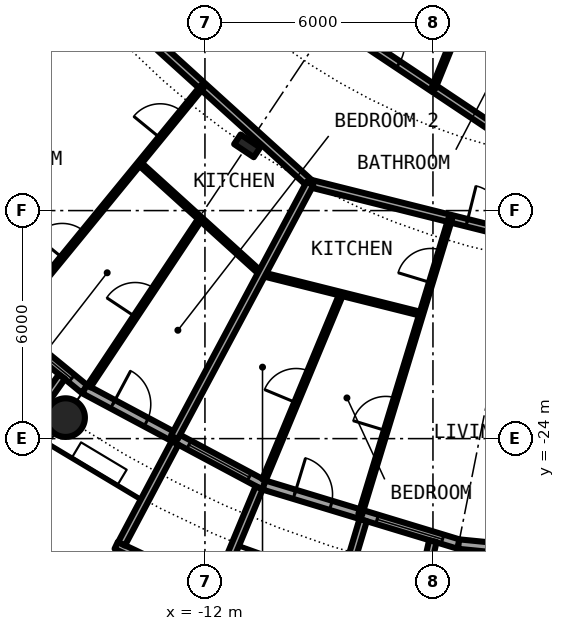
"""IFC4 building model, lengths in metres.
Left out: names, types, materials, properties, quantities, classifications, styles, units other than length and angle.
Written with IfcOpenShell. Run it as: python <this file> out.ifc"""

import sys

from ifc_helpers import new_model, si_unit, direction, frame, frame_2d, origin, origin_2d, place, context, subcontext, project, spatial, rectangle, circle, hollow_circle, i_section, extrude, element, fill, save


model = new_model("IFC4")
c1 = context("Model", 3, precision=1e-05, world=origin(), true_north=direction((0.0, 1.0)))
c2 = subcontext(c1, "Body", "Model", "MODEL_VIEW")
j1 = project(units=[si_unit("LENGTHUNIT", "METRE"), si_unit("PLANEANGLEUNIT", "RADIAN")], contexts=[c1])
p1 = place(None, origin())
s1 = spatial("IfcSite", under=j1, at=p1, CompositionType="ELEMENT")
p2 = place(p1, origin())
s2 = spatial("IfcBuilding", under=s1, at=p2, CompositionType="ELEMENT")
p3 = place(p2, frame((0.0, 0.0, 31.95)))
s3 = spatial("IfcBuildingStorey", under=s2, at=p3, CompositionType="ELEMENT", Elevation=31.95)
p4 = place(p3, frame((-15.667, -23.448, 0.0), z_axis=(0.0, 0.0, 1.0), x_axis=(1.0, 0.0, 0.0)))
e1 = element("IfcColumn", 1, at=p4, inside=s3, PredefinedType="COLUMN", context=c2, shape_type="SweptSolid", body=[
    extrude(hollow_circle(Radius=0.508, WallThickness=0.05, at=origin_2d()), origin(), (0.0, 0.0, 1.0), 3.05),
])
p5 = place(p3, frame((-10.889, -16.297, 0.0), z_axis=(0.0, 0.0, 1.0), x_axis=(-0.55557023302, -0.831469612303, 0.0)))
e2 = element("IfcColumn", 2, at=p5, inside=s3, PredefinedType="COLUMN", context=c2, shape_type="SweptSolid", body=[
    extrude(i_section(OverallWidth=0.305, OverallDepth=0.62, WebThickness=0.021, FlangeThickness=0.04, FilletRadius=0.027, at=origin_2d()), origin(), (0.0, 0.0, 1.0), 3.05),
])
p6 = place(p3, frame((-19.304, -19.304, 0.0), z_axis=(0.0, 0.0, 1.0), x_axis=(0.773019449054, -0.634382322723, 0.0)))
e3 = element("IfcWall", 3, at=p6, inside=s3, PredefinedType="SOLIDWALL", context=c2, shape_type="SweptSolid", body=[
    extrude(rectangle(XDim=5.352, YDim=0.25, at=frame_2d((2.676, 0.0))), origin(), (0.0, 0.0, 1.0), 2.7),
])
p7 = place(p6, frame((0.841, 0.0, 0.0)))
e4 = element("IfcOpeningElement", 4, at=p7, cuts=e3, PredefinedType="OPENING", context=c2, shape_type="SweptSolid", body=[
    extrude(rectangle(XDim=1.0, YDim=2.2, at=frame_2d((0.5, 1.1))), frame((0.0, 0.135, 0.0), z_axis=(0.0, -1.0, 0.0), x_axis=(1.0, 0.0, 0.0)), (0.0, 0.0, 1.0), 0.27),
])
p8 = place(p6, frame((3.111, 0.0, 0.3)))
e5 = element("IfcOpeningElement", 5, at=p8, cuts=e3, PredefinedType="OPENING", context=c2, shape_type="SweptSolid", body=[
    extrude(rectangle(XDim=1.8, YDim=2.1, at=frame_2d((0.9, 1.05))), frame((0.0, 0.135, 0.0), z_axis=(0.0, -1.0, 0.0), x_axis=(1.0, 0.0, 0.0)), (0.0, 0.0, 1.0), 0.27),
])
p9 = place(p3, frame((-15.765, -22.37, -0.03), z_axis=(0.0, 0.0, 1.0), x_axis=(-0.576274612209, -0.817256123454, 0.0)))
e6 = element("IfcWall", 6, at=p9, inside=s3, PredefinedType="SOLIDWALL", context=c2, shape_type="SweptSolid", body=[
    extrude(rectangle(XDim=2.933, YDim=0.2, at=frame_2d((1.466, 0.0))), origin(), (0.0, 0.0, 1.0), 2.73),
])
p10 = place(p3, frame((-15.167, -22.699, 0.0), z_axis=(0.0, 0.0, 1.0), x_axis=(0.881915646801, -0.471407246368, 0.0)))
e7 = element("IfcWall", 7, at=p10, inside=s3, PredefinedType="SOLIDWALL", context=c2, shape_type="SweptSolid", body=[
    extrude(rectangle(XDim=5.352, YDim=0.25, at=frame_2d((2.676, 0.0))), origin(), (0.0, 0.0, 1.0), 2.7),
])
p11 = place(p10, frame((0.841, 0.0, 0.0)))
e8 = element("IfcOpeningElement", 8, at=p11, cuts=e7, PredefinedType="OPENING", context=c2, shape_type="SweptSolid", body=[
    extrude(rectangle(XDim=1.0, YDim=2.2, at=frame_2d((0.5, 1.1))), frame((0.0, 0.135, 0.0), z_axis=(0.0, -1.0, 0.0), x_axis=(1.0, 0.0, 0.0)), (0.0, 0.0, 1.0), 0.27),
])
p12 = place(p10, frame((3.111, 0.0, 0.3)))
e9 = element("IfcOpeningElement", 9, at=p12, cuts=e7, PredefinedType="OPENING", context=c2, shape_type="SweptSolid", body=[
    extrude(rectangle(XDim=1.8, YDim=2.1, at=frame_2d((0.9, 1.05))), frame((0.0, 0.135, 0.0), z_axis=(0.0, -1.0, 0.0), x_axis=(1.0, 0.0, 0.0)), (0.0, 0.0, 1.0), 0.27),
])
p13 = place(p3, frame((-14.335, -26.808, -0.03), z_axis=(0.0, 0.0, 1.0), x_axis=(0.904000060331, -0.427532327342, 0.0)))
e10 = element("IfcWall", 10, at=p13, inside=s3, PredefinedType="SOLIDWALL", context=c2, shape_type="SweptSolid", body=[
    extrude(rectangle(XDim=2.993, YDim=0.2, at=frame_2d((1.497, 0.0))), origin(), (0.0, 0.0, 1.0), 2.73),
])
p14 = place(p13, frame((0.457, 0.0, 0.33)))
e11 = element("IfcOpeningElement", 11, at=p14, cuts=e10, PredefinedType="OPENING", context=c2, shape_type="SweptSolid", body=[
    extrude(circle(Radius=1.04, at=frame_2d((1.04, 1.04))), frame((0.0, 0.11, 0.0), z_axis=(0.0, -1.0, 0.0), x_axis=(1.0, 0.0, 0.0)), (0.0, 0.0, 1.0), 0.22),
])
p15 = place(p3, frame((-12.787, -24.113, -0.03), z_axis=(0.0, 0.0, 1.0), x_axis=(-0.468365282436, -0.883534924159, 0.0)))
e12 = element("IfcWall", 12, at=p15, inside=s3, PredefinedType="SOLIDWALL", context=c2, shape_type="SweptSolid", body=[
    extrude(rectangle(XDim=3.006, YDim=0.2, at=frame_2d((1.503, 0.0))), origin(), (0.0, 0.0, 1.0), 2.73),
])
p16 = place(p3, frame((-10.575, -25.295, -0.03), z_axis=(0.0, 0.0, 1.0), x_axis=(-0.385697364644, -0.922625353492, 0.0)))
e13 = element("IfcWall", 13, at=p16, inside=s3, PredefinedType="SOLIDWALL", context=c2, shape_type="SweptSolid", body=[
    extrude(rectangle(XDim=2.883, YDim=0.2, at=frame_2d((1.442, 0.0))), origin(), (0.0, 0.0, 1.0), 2.73),
])
p17 = place(p3, frame((-10.447, -25.222, 0.0), z_axis=(0.0, 0.0, 1.0), x_axis=(0.956965678721, -0.290201119486, 0.0)))
e14 = element("IfcWall", 14, at=p17, inside=s3, PredefinedType="SOLIDWALL", context=c2, shape_type="SweptSolid", body=[
    extrude(rectangle(XDim=5.351, YDim=0.25, at=frame_2d((2.676, 0.0))), origin(), (0.0, 0.0, 1.0), 2.7),
])
p18 = place(p17, frame((0.841, 0.0, 0.0)))
e15 = element("IfcOpeningElement", 15, at=p18, cuts=e14, PredefinedType="OPENING", context=c2, shape_type="SweptSolid", body=[
    extrude(rectangle(XDim=1.0, YDim=2.2, at=frame_2d((0.5, 1.1))), frame((0.0, 0.135, 0.0), z_axis=(0.0, -1.0, 0.0), x_axis=(1.0, 0.0, 0.0)), (0.0, 0.0, 1.0), 0.27),
])
p19 = place(p17, frame((3.111, 0.0, 0.3)))
e16 = element("IfcOpeningElement", 16, at=p19, cuts=e14, PredefinedType="OPENING", context=c2, shape_type="SweptSolid", body=[
    extrude(rectangle(XDim=1.8, YDim=2.1, at=frame_2d((0.9, 1.05))), frame((0.0, 0.135, 0.0), z_axis=(0.0, -1.0, 0.0), x_axis=(1.0, 0.0, 0.0)), (0.0, 0.0, 1.0), 0.27),
])
p20 = place(p3, frame((-7.837, -26.144, -0.03), z_axis=(0.0, 0.0, 1.0), x_axis=(-0.287064767992, -0.957911174889, 0.0)))
e17 = element("IfcWall", 17, at=p20, inside=s3, PredefinedType="SOLIDWALL", context=c2, shape_type="SweptSolid", body=[
    extrude(rectangle(XDim=3.006, YDim=0.2, at=frame_2d((1.503, 0.0))), origin(), (0.0, 0.0, 1.0), 2.73),
])
p21 = place(p3, frame((-6.004, -26.7, -0.03), z_axis=(0.0, 0.0, 1.0), x_axis=(-0.219609259383, -0.975587911566, 0.0)))
e18 = element("IfcWall", 18, at=p21, inside=s3, PredefinedType="SOLIDWALL", context=c2, shape_type="SweptSolid", body=[
    extrude(rectangle(XDim=2.933, YDim=0.2, at=frame_2d((1.466, 0.0))), origin(), (0.0, 0.0, 1.0), 2.73),
])
p22 = place(p3, frame((-5.326, -26.775, 0.0), z_axis=(0.0, 0.0, 1.0), x_axis=(0.995173996315, -0.098126026407, 0.0)))
e19 = element("IfcWall", 19, at=p22, inside=s3, PredefinedType="SOLIDWALL", context=c2, shape_type="SweptSolid", body=[
    extrude(rectangle(XDim=5.352, YDim=0.25, at=frame_2d((2.676, 0.0))), origin(), (0.0, 0.0, 1.0), 2.7),
])
p23 = place(p22, frame((0.841, 0.0, 0.0)))
e20 = element("IfcOpeningElement", 20, at=p23, cuts=e19, PredefinedType="OPENING", context=c2, shape_type="SweptSolid", body=[
    extrude(rectangle(XDim=1.0, YDim=2.2, at=frame_2d((0.5, 1.1))), frame((0.0, 0.135, 0.0), z_axis=(0.0, -1.0, 0.0), x_axis=(1.0, 0.0, 0.0)), (0.0, 0.0, 1.0), 0.27),
])
p24 = place(p22, frame((3.111, 0.0, 0.3)))
e21 = element("IfcOpeningElement", 21, at=p24, cuts=e19, PredefinedType="OPENING", context=c2, shape_type="SweptSolid", body=[
    extrude(rectangle(XDim=1.8, YDim=2.1, at=frame_2d((0.9, 1.05))), frame((0.0, 0.135, 0.0), z_axis=(0.0, -1.0, 0.0), x_axis=(1.0, 0.0, 0.0)), (0.0, 0.0, 1.0), 0.27),
])
p25 = place(p3, frame((-13.727, -16.754, 0.0), z_axis=(0.0, 0.0, 1.0), x_axis=(0.740840803797, -0.671680655839, 0.0)))
e22 = element("IfcWall", 22, at=p25, inside=s3, PredefinedType="PARTITIONING", context=c2, shape_type="SweptSolid", body=[
    extrude(rectangle(XDim=4.338, YDim=0.1, at=frame_2d((2.169, 0.0))), origin(), (0.0, 0.0, 1.0), 2.7),
])
p26 = place(p3, frame((-10.516, -19.666, 0.0), z_axis=(0.0, 0.0, 1.0), x_axis=(0.97005315629, -0.242892721118, 0.0)))
e23 = element("IfcWall", 23, at=p26, inside=s3, PredefinedType="PARTITIONING", context=c2, shape_type="SweptSolid", body=[
    extrude(rectangle(XDim=4.343, YDim=0.1, at=frame_2d((2.172, 0.0))), origin(), (0.0, 0.0, 1.0), 2.7),
])
p27 = place(p3, frame((-16.18, -10.994, 0.0), z_axis=(0.0, 0.0, 1.0), x_axis=(0.74089212117, -0.671624050186, 0.0)))
e24 = element("IfcWall", 24, at=p27, inside=s3, PredefinedType="PARTITIONING", context=c2, shape_type="SweptSolid", body=[
    extrude(rectangle(XDim=9.368, YDim=0.2, at=frame_2d((4.684, 0.0))), origin(), (0.0, 0.0, 1.0), 2.38),
])
p28 = place(p27, frame((3.153, 0.0, 0.0)))
e25 = element("IfcOpeningElement", 25, at=p28, cuts=e24, PredefinedType="OPENING", context=c2, shape_type="SweptSolid", body=[
    extrude(rectangle(XDim=1.0, YDim=2.3, at=frame_2d((0.5, 1.15))), frame((0.0, 0.11, 0.0), z_axis=(0.0, -1.0, 0.0), x_axis=(1.0, 0.0, 0.0)), (0.0, 0.0, 1.0), 0.22),
])
p29 = place(p3, frame((-9.242, -17.284, 0.0), z_axis=(0.0, 0.0, 1.0), x_axis=(0.970002158938, -0.243096301198, 0.0)))
e26 = element("IfcWall", 26, at=p29, inside=s3, PredefinedType="PARTITIONING", context=c2, shape_type="SweptSolid", body=[
    extrude(rectangle(XDim=9.528, YDim=0.2, at=frame_2d((4.764, 0.0))), origin(), (0.0, 0.0, 1.0), 2.38),
])
p30 = place(p29, frame((4.262, 0.0, 0.0)))
e27 = element("IfcOpeningElement", 27, at=p30, cuts=e26, PredefinedType="OPENING", context=c2, shape_type="SweptSolid", body=[
    extrude(rectangle(XDim=1.0, YDim=2.3, at=frame_2d((0.5, 1.15))), frame((0.0, 0.11, 0.0), z_axis=(0.0, -1.0, 0.0), x_axis=(1.0, 0.0, 0.0)), (0.0, 0.0, 1.0), 0.22),
])
p31 = place(p3, frame((-14.036, -9.402, 0.0), z_axis=(0.0, 0.0, 1.0), x_axis=(0.831561346449, -0.555432918625, 0.0)))
e28 = element("IfcWall", 28, at=p31, inside=s3, PredefinedType="PARTITIONING", context=c2, shape_type="SweptSolid", body=[
    extrude(rectangle(XDim=12.914, YDim=0.2, at=frame_2d((6.457, 0.0))), origin(), (0.0, 0.0, 1.0), 2.7),
])
p32 = place(p31, frame((7.566, 0.0, 0.0)))
e29 = element("IfcOpeningElement", 29, at=p32, cuts=e28, PredefinedType="OPENING", context=c2, shape_type="SweptSolid", body=[
    extrude(rectangle(XDim=1.0, YDim=2.3, at=frame_2d((0.5, 1.15))), frame((0.0, 0.11, 0.0), z_axis=(0.0, -1.0, 0.0), x_axis=(1.0, 0.0, 0.0)), (0.0, 0.0, 1.0), 0.22),
])
p33 = place(p3, frame((-5.029, -12.418, 0.0), z_axis=(0.0, 0.0, 1.0), x_axis=(0.831538390496, -0.555467285384, 0.0)))
e30 = element("IfcWall", 30, at=p33, inside=s3, PredefinedType="PARTITIONING", context=c2, shape_type="SweptSolid", body=[
    extrude(rectangle(XDim=2.717, YDim=0.1, at=frame_2d((1.358, 0.0))), origin(), (0.0, 0.0, 1.0), 2.7),
])
p34 = place(p33, frame((0.908, 0.0, 0.0)))
e31 = element("IfcOpeningElement", 31, at=p34, cuts=e30, PredefinedType="OPENING", context=c2, shape_type="SweptSolid", body=[
    extrude(rectangle(XDim=0.9, YDim=2.3, at=frame_2d((0.45, 1.15))), frame((0.0, 0.06, 0.0), z_axis=(0.0, -1.0, 0.0), x_axis=(1.0, 0.0, 0.0)), (0.0, 0.0, 1.0), 0.12),
])
p35 = place(p3, frame((-17.219, -21.023, 0.0), z_axis=(0.0, 0.0, 1.0), x_axis=(0.633664062855, 0.773608334654, 0.0)))
e32 = element("IfcWall", 32, at=p35, inside=s3, PredefinedType="PARTITIONING", context=c2, shape_type="SweptSolid", body=[
    extrude(rectangle(XDim=8.138, YDim=0.1, at=frame_2d((4.069, 0.0))), origin(), (0.0, 0.0, 1.0), 2.7),
])
p36 = place(p35, frame((6.377, 0.0, 0.0)))
e33 = element("IfcOpeningElement", 33, at=p36, cuts=e32, PredefinedType="OPENING", context=c2, shape_type="SweptSolid", body=[
    extrude(rectangle(XDim=0.9, YDim=2.3, at=frame_2d((0.45, 1.15))), frame((0.0, 0.06, 0.0), z_axis=(0.0, -1.0, 0.0), x_axis=(1.0, 0.0, 0.0)), (0.0, 0.0, 1.0), 0.12),
])
p37 = place(p35, frame((2.308, 0.0, 0.0)))
e34 = element("IfcOpeningElement", 34, at=p37, cuts=e32, PredefinedType="OPENING", context=c2, shape_type="SweptSolid", body=[
    extrude(rectangle(XDim=0.9, YDim=2.3, at=frame_2d((0.45, 1.15))), frame((0.0, 0.06, 0.0), z_axis=(0.0, -1.0, 0.0), x_axis=(1.0, 0.0, 0.0)), (0.0, 0.0, 1.0), 0.12),
])
p38 = place(p3, frame((-16.936, -13.845, 0.0), z_axis=(0.0, 0.0, 1.0), x_axis=(0.774162545943, 0.632986850147, 0.0)))
e35 = element("IfcWall", 35, at=p38, inside=s3, PredefinedType="PARTITIONING", context=c2, shape_type="SweptSolid", body=[
    extrude(rectangle(XDim=2.649, YDim=0.1, at=frame_2d((1.325, 0.0))), origin(), (0.0, 0.0, 1.0), 2.7),
])
p39 = place(p38, frame((0.875, 0.0, 0.0)))
e36 = element("IfcOpeningElement", 36, at=p39, cuts=e35, PredefinedType="OPENING", context=c2, shape_type="SweptSolid", body=[
    extrude(rectangle(XDim=0.9, YDim=2.3, at=frame_2d((0.45, 1.15))), frame((0.0, 0.06, 0.0), z_axis=(0.0, -1.0, 0.0), x_axis=(1.0, 0.0, 0.0)), (0.0, 0.0, 1.0), 0.12),
])
p40 = place(p3, frame((-15.054, -22.624, 0.0), z_axis=(0.0, 0.0, 1.0), x_axis=(0.553913391217, 0.832574294, 0.0)))
e37 = element("IfcWall", 37, at=p40, inside=s3, PredefinedType="PARTITIONING", context=c2, shape_type="SweptSolid", body=[
    extrude(rectangle(XDim=5.301, YDim=0.1, at=frame_2d((2.65, 0.0))), origin(), (0.0, 0.0, 1.0), 2.7),
])
p41 = place(p40, frame((2.2, 0.0, 0.0)))
e38 = element("IfcOpeningElement", 38, at=p41, cuts=e37, PredefinedType="OPENING", context=c2, shape_type="SweptSolid", body=[
    extrude(rectangle(XDim=0.9, YDim=2.3, at=frame_2d((0.45, 1.15))), frame((0.0, 0.06, 0.0), z_axis=(0.0, -1.0, 0.0), x_axis=(1.0, 0.0, 0.0)), (0.0, 0.0, 1.0), 0.12),
])
p42 = place(p3, frame((-12.805, -23.968, 0.0), z_axis=(0.0, 0.0, 1.0), x_axis=(0.471173668908, 0.882040460369, 0.0)))
e39 = element("IfcWall", 39, at=p42, inside=s3, PredefinedType="PARTITIONING", context=c2, shape_type="SweptSolid", body=[
    extrude(rectangle(XDim=7.574, YDim=0.2, at=frame_2d((3.787, 0.0))), origin(), (0.0, 0.0, 1.0), 2.7),
])
p43 = place(p3, frame((-10.447, -25.086, 0.0), z_axis=(0.0, 0.0, 1.0), x_axis=(0.384363513821, 0.923181828917, 0.0)))
e40 = element("IfcWall", 40, at=p43, inside=s3, PredefinedType="PARTITIONING", context=c2, shape_type="SweptSolid", body=[
    extrude(rectangle(XDim=5.3, YDim=0.1, at=frame_2d((2.65, 0.0))), origin(), (0.0, 0.0, 1.0), 2.7),
])
p44 = place(p43, frame((2.2, 0.0, 0.0)))
e41 = element("IfcOpeningElement", 41, at=p44, cuts=e40, PredefinedType="OPENING", context=c2, shape_type="SweptSolid", body=[
    extrude(rectangle(XDim=0.9, YDim=2.3, at=frame_2d((0.45, 1.15))), frame((0.0, 0.06, 0.0), z_axis=(0.0, -1.0, 0.0), x_axis=(1.0, 0.0, 0.0)), (0.0, 0.0, 1.0), 0.12),
])
p45 = place(p3, frame((-7.914, -25.997, 0.0), z_axis=(0.0, 0.0, 1.0), x_axis=(0.291319167605, 0.956625915698, 0.0)))
e42 = element("IfcWall", 42, at=p45, inside=s3, PredefinedType="PARTITIONING", context=c2, shape_type="SweptSolid", body=[
    extrude(rectangle(XDim=8.139, YDim=0.1, at=frame_2d((4.07, 0.0))), origin(), (0.0, 0.0, 1.0), 2.7),
])
p46 = place(p45, frame((6.377, 0.0, 0.0)))
e43 = element("IfcOpeningElement", 43, at=p46, cuts=e42, PredefinedType="OPENING", context=c2, shape_type="SweptSolid", body=[
    extrude(rectangle(XDim=0.9, YDim=2.3, at=frame_2d((0.45, 1.15))), frame((0.0, 0.06, 0.0), z_axis=(0.0, -1.0, 0.0), x_axis=(1.0, 0.0, 0.0)), (0.0, 0.0, 1.0), 0.12),
])
p47 = place(p45, frame((2.308, 0.0, 0.0)))
e44 = element("IfcOpeningElement", 44, at=p47, cuts=e42, PredefinedType="OPENING", context=c2, shape_type="SweptSolid", body=[
    extrude(rectangle(XDim=0.9, YDim=2.3, at=frame_2d((0.45, 1.15))), frame((0.0, 0.06, 0.0), z_axis=(0.0, -1.0, 0.0), x_axis=(1.0, 0.0, 0.0)), (0.0, 0.0, 1.0), 0.12),
])
p48 = place(p3, frame((-5.986, -14.779, 0.0), z_axis=(0.0, 0.0, 1.0), x_axis=(0.375649498413, 0.926761811008, 0.0)))
e45 = element("IfcWall", 45, at=p48, inside=s3, PredefinedType="PARTITIONING", context=c2, shape_type="SweptSolid", body=[
    extrude(rectangle(XDim=2.548, YDim=0.1, at=frame_2d((1.274, 0.0))), origin(), (0.0, 0.0, 1.0), 2.7),
])
p49 = place(p8, origin())
e46 = element("IfcWindow", 46, at=p49, inside=s3, PartitioningType="SINGLE_PANEL", PredefinedType="WINDOW", context=c2, shape_type="SweptSolid", body=[
    extrude(rectangle(XDim=1.8, YDim=2.1, at=frame_2d((0.9, 1.05))), frame((0.0, 0.03, 0.0), z_axis=(0.0, -1.0, 0.0), x_axis=(1.0, 0.0, 0.0)), (0.0, 0.0, 1.0), 0.06),
])
fill(e5, e46)
p50 = place(p11, origin())
e47 = element("IfcDoor", 47, at=p50, inside=s3, OperationType="SINGLE_SWING_LEFT", PredefinedType="DOOR", context=c2, shape_type="SweptSolid", body=[
    extrude(rectangle(XDim=1.0, YDim=2.2, at=frame_2d((0.5, 1.1))), frame((0.0, 0.025, 0.0), z_axis=(0.0, -1.0, 0.0), x_axis=(1.0, 0.0, 0.0)), (0.0, 0.0, 1.0), 0.05),
])
fill(e8, e47)
p51 = place(p12, origin())
e48 = element("IfcWindow", 48, at=p51, inside=s3, PartitioningType="SINGLE_PANEL", PredefinedType="WINDOW", context=c2, shape_type="SweptSolid", body=[
    extrude(rectangle(XDim=1.8, YDim=2.1, at=frame_2d((0.9, 1.05))), frame((0.0, 0.03, 0.0), z_axis=(0.0, -1.0, 0.0), x_axis=(1.0, 0.0, 0.0)), (0.0, 0.0, 1.0), 0.06),
])
fill(e9, e48)
p52 = place(p14, origin())
e49 = element("IfcWindow", 49, at=p52, inside=s3, PartitioningType="SINGLE_PANEL", PredefinedType="WINDOW", context=c2, shape_type="SweptSolid", body=[
    extrude(circle(Radius=1.04, at=frame_2d((1.04, 1.04))), frame((0.0, 0.03, 0.0), z_axis=(0.0, -1.0, 0.0), x_axis=(1.0, 0.0, 0.0)), (0.0, 0.0, 1.0), 0.06),
])
fill(e11, e49)
p53 = place(p18, origin())
e50 = element("IfcDoor", 50, at=p53, inside=s3, OperationType="SINGLE_SWING_LEFT", PredefinedType="DOOR", context=c2, shape_type="SweptSolid", body=[
    extrude(rectangle(XDim=1.0, YDim=2.2, at=frame_2d((0.5, 1.1))), frame((0.0, 0.025, 0.0), z_axis=(0.0, -1.0, 0.0), x_axis=(1.0, 0.0, 0.0)), (0.0, 0.0, 1.0), 0.05),
])
fill(e15, e50)
p54 = place(p19, origin())
e51 = element("IfcWindow", 51, at=p54, inside=s3, PartitioningType="SINGLE_PANEL", PredefinedType="WINDOW", context=c2, shape_type="SweptSolid", body=[
    extrude(rectangle(XDim=1.8, YDim=2.1, at=frame_2d((0.9, 1.05))), frame((0.0, 0.03, 0.0), z_axis=(0.0, -1.0, 0.0), x_axis=(1.0, 0.0, 0.0)), (0.0, 0.0, 1.0), 0.06),
])
fill(e16, e51)
p55 = place(p36, origin())
e52 = element("IfcDoor", 52, at=p55, inside=s3, OperationType="SINGLE_SWING_RIGHT", PredefinedType="DOOR", context=c2, shape_type="SweptSolid", body=[
    extrude(rectangle(XDim=0.9, YDim=2.3, at=frame_2d((0.45, 1.15))), frame((0.0, 0.025, 0.0), z_axis=(0.0, -1.0, 0.0), x_axis=(1.0, 0.0, 0.0)), (0.0, 0.0, 1.0), 0.05),
])
fill(e33, e52)
p56 = place(p37, origin())
e53 = element("IfcDoor", 53, at=p56, inside=s3, OperationType="SINGLE_SWING_LEFT", PredefinedType="DOOR", context=c2, shape_type="SweptSolid", body=[
    extrude(rectangle(XDim=0.9, YDim=2.3, at=frame_2d((0.45, 1.15))), frame((0.0, 0.025, 0.0), z_axis=(0.0, -1.0, 0.0), x_axis=(1.0, 0.0, 0.0)), (0.0, 0.0, 1.0), 0.05),
])
fill(e34, e53)
p57 = place(p41, origin())
e54 = element("IfcDoor", 54, at=p57, inside=s3, OperationType="SINGLE_SWING_RIGHT", PredefinedType="DOOR", context=c2, shape_type="SweptSolid", body=[
    extrude(rectangle(XDim=0.9, YDim=2.3, at=frame_2d((0.45, 1.15))), frame((0.0, 0.025, 0.0), z_axis=(0.0, -1.0, 0.0), x_axis=(1.0, 0.0, 0.0)), (0.0, 0.0, 1.0), 0.05),
])
fill(e38, e54)
p58 = place(p30, origin())
e55 = element("IfcDoor", 55, at=p58, inside=s3, OperationType="SINGLE_SWING_LEFT", PredefinedType="DOOR", context=c2, shape_type="SweptSolid", body=[
    extrude(rectangle(XDim=1.0, YDim=2.3, at=frame_2d((0.5, 1.15))), frame((0.0, 0.025, 0.0), z_axis=(0.0, -1.0, 0.0), x_axis=(1.0, 0.0, 0.0)), (0.0, 0.0, 1.0), 0.05),
])
fill(e27, e55)
p59 = place(p46, origin())
e56 = element("IfcDoor", 56, at=p59, inside=s3, OperationType="SINGLE_SWING_RIGHT", PredefinedType="DOOR", context=c2, shape_type="SweptSolid", body=[
    extrude(rectangle(XDim=0.9, YDim=2.3, at=frame_2d((0.45, 1.15))), frame((0.0, 0.025, 0.0), z_axis=(0.0, -1.0, 0.0), x_axis=(1.0, 0.0, 0.0)), (0.0, 0.0, 1.0), 0.05),
])
fill(e43, e56)
p60 = place(p47, origin())
e57 = element("IfcDoor", 57, at=p60, inside=s3, OperationType="SINGLE_SWING_LEFT", PredefinedType="DOOR", context=c2, shape_type="SweptSolid", body=[
    extrude(rectangle(XDim=0.9, YDim=2.3, at=frame_2d((0.45, 1.15))), frame((0.0, 0.025, 0.0), z_axis=(0.0, -1.0, 0.0), x_axis=(1.0, 0.0, 0.0)), (0.0, 0.0, 1.0), 0.05),
])
fill(e44, e57)
p61 = place(p44, origin())
e58 = element("IfcDoor", 58, at=p61, inside=s3, OperationType="SINGLE_SWING_RIGHT", PredefinedType="DOOR", context=c2, shape_type="SweptSolid", body=[
    extrude(rectangle(XDim=0.9, YDim=2.3, at=frame_2d((0.45, 1.15))), frame((0.0, 0.025, 0.0), z_axis=(0.0, -1.0, 0.0), x_axis=(1.0, 0.0, 0.0)), (0.0, 0.0, 1.0), 0.05),
])
fill(e41, e58)
p62 = place(p32, origin())
e59 = element("IfcDoor", 59, at=p62, inside=s3, OperationType="SINGLE_SWING_RIGHT", PredefinedType="DOOR", context=c2, shape_type="SweptSolid", body=[
    extrude(rectangle(XDim=1.0, YDim=2.3, at=frame_2d((0.5, 1.15))), frame((0.0, 0.025, 0.0), z_axis=(0.0, -1.0, 0.0), x_axis=(1.0, 0.0, 0.0)), (0.0, 0.0, 1.0), 0.05),
])
fill(e29, e59)
save(model, sys.argv[1])
